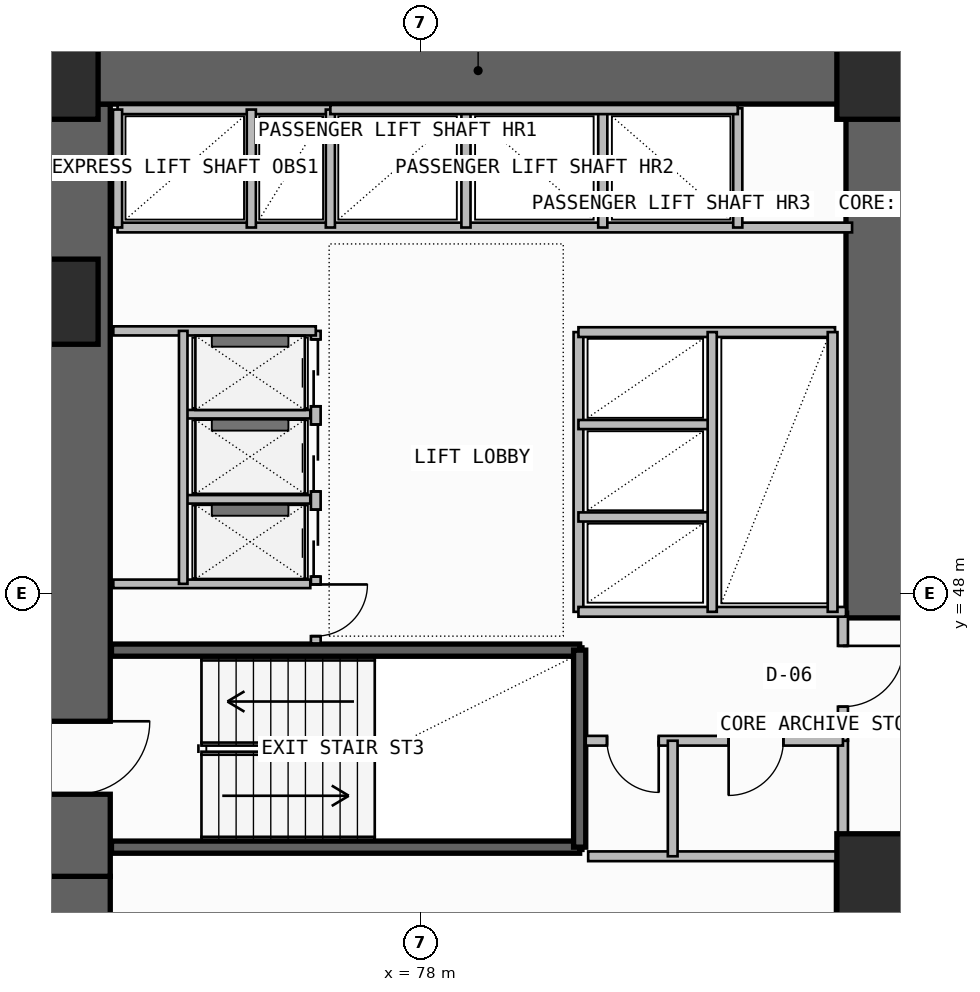
"""IFC4 building model, lengths in metres.
Left out: names, types, materials, properties, quantities, classifications, styles, units other than length and angle.
Written with IfcOpenShell. Run it as: python <this file> out.ifc"""

import sys

from ifc_helpers import new_model, si_unit, direction, frame, frame_2d, origin, origin_2d, place, context, subcontext, project, spatial, rectangle, extrude, element, fill, save


model = new_model("IFC4")
c1 = context("Model", 3, precision=1e-05, world=origin(), true_north=direction((0.0, 1.0)))
c2 = subcontext(c1, "Body", "Model", "MODEL_VIEW")
j1 = project(units=[si_unit("LENGTHUNIT", "METRE"), si_unit("PLANEANGLEUNIT", "RADIAN")], contexts=[c1])
p1 = place(None, origin())
s1 = spatial("IfcSite", under=j1, at=p1, CompositionType="ELEMENT")
p2 = place(p1, origin())
s2 = spatial("IfcBuilding", under=s1, at=p2, CompositionType="ELEMENT")
p3 = place(p2, frame((0.0, 0.0, 41.1)))
s3 = spatial("IfcBuildingStorey", under=s2, at=p3, CompositionType="ELEMENT", Elevation=41.1)
p4 = place(p3, frame((72.35, 35.5, -0.2), z_axis=(0.0, 0.0, 1.0), x_axis=(0.0, 1.0, 0.0)))
e1 = element("IfcWall", 1, at=p4, inside=s3, PredefinedType="SHEAR", context=c2, shape_type="SweptSolid", body=[
    extrude(rectangle(XDim=7.85, YDim=1.1, at=frame_2d((3.925, 0.0))), origin(), (0.0, 0.0, 1.0), 3.6),
])
p5 = place(p4, frame((1.45, 0.0, 0.2)))
e2 = element("IfcOpeningElement", 2, at=p5, cuts=e1, PredefinedType="OPENING", context=c2, shape_type="SweptSolid", body=[
    extrude(rectangle(XDim=1.2, YDim=2.2, at=frame_2d((0.6, 1.1))), frame((0.0, 0.56, 0.0), z_axis=(0.0, -1.0, 0.0), x_axis=(1.0, 0.0, 0.0)), (0.0, 0.0, 1.0), 1.12),
])
p6 = place(p3, frame((72.35, 43.35, -0.2), z_axis=(0.0, 0.0, 1.0), x_axis=(0.0, 1.0, 0.0)))
e3 = element("IfcWall", 3, at=p6, inside=s3, PredefinedType="SHEAR", context=c2, shape_type="SweptSolid", body=[
    extrude(rectangle(XDim=12.7, YDim=1.1, at=frame_2d((6.35, 0.0))), origin(), (0.0, 0.0, 1.0), 3.6),
])
p7 = place(p6, frame((1.35, 0.0, 0.2)))
e4 = element("IfcOpeningElement", 4, at=p7, cuts=e3, PredefinedType="OPENING", context=c2, shape_type="SweptSolid", body=[
    extrude(rectangle(XDim=1.2, YDim=2.2, at=frame_2d((0.6, 1.1))), frame((0.0, 0.56, 0.0), z_axis=(0.0, -1.0, 0.0), x_axis=(1.0, 0.0, 0.0)), (0.0, 0.0, 1.0), 1.12),
])
p8 = place(p3, frame((71.8, 56.6, -0.2), z_axis=(0.0, 0.0, 1.0), x_axis=(1.0, 0.0, 0.0)))
e5 = element("IfcWall", 5, at=p8, inside=s3, PredefinedType="SHEAR", context=c2, shape_type="SweptSolid", body=[
    extrude(rectangle(XDim=14.3, YDim=1.1, at=frame_2d((7.15, 0.0))), origin(), (0.0, 0.0, 1.0), 3.6),
])
p9 = place(p3, frame((85.55, 47.6, -0.2), z_axis=(0.0, 0.0, 1.0), x_axis=(0.0, 1.0, 0.0)))
e6 = element("IfcWall", 6, at=p9, inside=s3, PredefinedType="SHEAR", context=c2, shape_type="SweptSolid", body=[
    extrude(rectangle(XDim=8.45, YDim=1.1, at=frame_2d((4.225, 0.0))), origin(), (0.0, 0.0, 1.0), 3.6),
])
for number, where, z_axis, x_axis in (
    (7, (85.55, 43.35, 0.0), (0.0, 0.0, 1.0), (1.0, 0.0, 0.0)),
    (8, (72.0, 52.8, 0.0), (0.0, 0.0, 1.0), (1.0, 0.0, 0.0)),
    (9, (72.0, 56.5, 0.0), (0.0, 0.0, 1.0), (1.0, 0.0, 0.0)),
    (10, (85.55, 56.5, 0.0), (0.0, 0.0, 1.0), (1.0, 0.0, 0.0)),
):
    element("IfcColumn", number, at=place(p3, frame(where, z_axis=z_axis, x_axis=x_axis)), inside=s3, PredefinedType="COLUMN", context=c2, shape_type="SweptSolid", body=[
        extrude(rectangle(XDim=1.4, YDim=1.4, at=origin_2d()), origin(), (0.0, 0.0, 1.0), 3.6),
    ])
p10 = place(p3, frame((84.92, 38.85, 0.0), z_axis=(0.0, 0.0, 1.0), x_axis=(0.0, 1.0, 0.0)))
e11 = element("IfcWall", 11, at=p10, inside=s3, PredefinedType="SOLIDWALL", context=c2, shape_type="SweptSolid", body=[
    extrude(rectangle(XDim=4.83, YDim=0.2, at=frame_2d((2.415, 0.0))), origin(), (0.0, 0.0, 1.0), 3.4),
])
p11 = place(p10, frame((1.25, 0.0, 0.0)))
e12 = element("IfcOpeningElement", 12, at=p11, cuts=e11, PredefinedType="OPENING", context=c2, shape_type="SweptSolid", body=[
    extrude(rectangle(XDim=1.1, YDim=2.2, at=frame_2d((0.55, 1.1))), frame((0.0, 0.11, 0.0), z_axis=(0.0, -1.0, 0.0), x_axis=(1.0, 0.0, 0.0)), (0.0, 0.0, 1.0), 0.22),
])
for number, where, z_axis, x_axis in (
    (13, (72.92, 43.83, -0.2), (0.0, 0.0, 1.0), (1.0, 0.0, 0.0)),
    (14, (72.92, 47.07, -0.2), (0.0, 0.0, 1.0), (1.0, 0.0, 0.0)),
):
    element("IfcWall", number, at=place(p3, frame(where, z_axis=z_axis, x_axis=x_axis)), inside=s3, PredefinedType="SOLIDWALL", context=c2, shape_type="SweptSolid", body=[
        extrude(rectangle(XDim=7.7, YDim=0.2, at=frame_2d((3.85, 0.0))), origin(), (0.0, 0.0, 1.0), 3.6),
    ])
p12 = place(p3, frame((80.62, 43.83, -0.2), z_axis=(0.0, 0.0, 1.0), x_axis=(0.0, 1.0, 0.0)))
e15 = element("IfcWall", 15, at=p12, inside=s3, PredefinedType="SOLIDWALL", context=c2, shape_type="SweptSolid", body=[
    extrude(rectangle(XDim=3.24, YDim=0.2, at=frame_2d((1.62, 0.0))), origin(), (0.0, 0.0, 1.0), 3.6),
])
p13 = place(p3, frame((84.95, 43.68, 0.0), z_axis=(0.0, 0.0, 1.0), x_axis=(0.0, 1.0, 0.0)))
e16 = element("IfcWall", 16, at=p13, inside=s3, PredefinedType="PLUMBINGWALL", context=c2, shape_type="SweptSolid", body=[
    extrude(rectangle(XDim=1.9, YDim=0.165, at=frame_2d((0.95, 0.0))), origin(), (0.0, 0.0, 1.0), 3.4),
])
p14 = place(p3, frame((84.95, 45.58, 0.0), z_axis=(0.0, 0.0, 1.0), x_axis=(0.0, 1.0, 0.0)))
e17 = element("IfcWall", 17, at=p14, inside=s3, PredefinedType="PARTITIONING", context=c2, shape_type="SweptSolid", body=[
    extrude(rectangle(XDim=2.12, YDim=0.165, at=frame_2d((1.06, 0.0))), origin(), (0.0, 0.0, 1.0), 3.4),
])
p15 = place(p14, frame((0.56, 0.0, 0.0)))
e18 = element("IfcOpeningElement", 18, at=p15, cuts=e17, PredefinedType="OPENING", context=c2, shape_type="SweptSolid", body=[
    extrude(rectangle(XDim=1.0, YDim=2.2, at=frame_2d((0.5, 1.1))), frame((0.0, 0.093, 0.0), z_axis=(0.0, -1.0, 0.0), x_axis=(1.0, 0.0, 0.0)), (0.0, 0.0, 1.0), 0.185),
])
p16 = place(p3, frame((80.72, 45.58, 0.0), z_axis=(0.0, 0.0, 1.0), x_axis=(1.0, 0.0, 0.0)))
e19 = element("IfcWall", 19, at=p16, inside=s3, PredefinedType="PLUMBINGWALL", context=c2, shape_type="SweptSolid", body=[
    extrude(rectangle(XDim=4.23, YDim=0.16, at=frame_2d((2.115, 0.0))), origin(), (0.0, 0.0, 1.0), 3.4),
])
p17 = place(p16, frame((0.35, 0.0, 0.0)))
e20 = element("IfcOpeningElement", 20, at=p17, cuts=e19, PredefinedType="OPENING", context=c2, shape_type="SweptSolid", body=[
    extrude(rectangle(XDim=0.85, YDim=2.05, at=frame_2d((0.425, 1.025))), frame((0.0, 0.09, 0.0), z_axis=(0.0, -1.0, 0.0), x_axis=(1.0, 0.0, 0.0)), (0.0, 0.0, 1.0), 0.18),
])
p18 = place(p16, frame((2.35, 0.0, 0.0)))
e21 = element("IfcOpeningElement", 21, at=p18, cuts=e19, PredefinedType="OPENING", context=c2, shape_type="SweptSolid", body=[
    extrude(rectangle(XDim=0.9, YDim=2.1, at=frame_2d((0.45, 1.05))), frame((0.0, 0.09, 0.0), z_axis=(0.0, -1.0, 0.0), x_axis=(1.0, 0.0, 0.0)), (0.0, 0.0, 1.0), 0.18),
])
p19 = place(p3, frame((80.76, 43.68, 0.0), z_axis=(0.0, 0.0, 1.0), x_axis=(1.0, 0.0, 0.0)))
e22 = element("IfcWall", 22, at=p19, inside=s3, PredefinedType="PLUMBINGWALL", context=c2, shape_type="SweptSolid", body=[
    extrude(rectangle(XDim=4.19, YDim=0.16, at=frame_2d((2.095, 0.0))), origin(), (0.0, 0.0, 1.0), 3.4),
])
p20 = place(p3, frame((82.15, 43.68, 0.0), z_axis=(0.0, 0.0, 1.0), x_axis=(0.0, 1.0, 0.0)))
e23 = element("IfcWall", 23, at=p20, inside=s3, PredefinedType="PLUMBINGWALL", context=c2, shape_type="SweptSolid", body=[
    extrude(rectangle(XDim=1.9, YDim=0.16, at=frame_2d((0.95, 0.0))), origin(), (0.0, 0.0, 1.0), 3.4),
])
p21 = place(p3, frame((76.28, 47.18, 0.0), z_axis=(0.0, 0.0, 1.0), x_axis=(0.0, 1.0, 0.0)))
e24 = element("IfcWall", 24, at=p21, inside=s3, PredefinedType="SOLIDWALL", context=c2, shape_type="SweptSolid", body=[
    extrude(rectangle(XDim=5.14, YDim=0.16, at=frame_2d((2.57, 0.0))), origin(), (0.0, 0.0, 1.0), 3.4),
])
p22 = place(p21, frame((1.1, 0.0, 0.0)))
e25 = element("IfcOpeningElement", 25, at=p22, cuts=e24, PredefinedType="OPENING", context=c2, shape_type="SweptSolid", body=[
    extrude(rectangle(XDim=1.1, YDim=2.25, at=frame_2d((0.55, 1.125))), frame((0.0, 0.09, 0.0), z_axis=(0.0, -1.0, 0.0), x_axis=(1.0, 0.0, 0.0)), (0.0, 0.0, 1.0), 0.18),
])
p23 = place(p21, frame((2.5, 0.0, 0.0)))
e26 = element("IfcOpeningElement", 26, at=p23, cuts=e24, PredefinedType="OPENING", context=c2, shape_type="SweptSolid", body=[
    extrude(rectangle(XDim=1.1, YDim=2.25, at=frame_2d((0.55, 1.125))), frame((0.0, 0.09, 0.0), z_axis=(0.0, -1.0, 0.0), x_axis=(1.0, 0.0, 0.0)), (0.0, 0.0, 1.0), 0.18),
])
p24 = place(p21, frame((3.9, 0.0, 0.0)))
e27 = element("IfcOpeningElement", 27, at=p24, cuts=e24, PredefinedType="OPENING", context=c2, shape_type="SweptSolid", body=[
    extrude(rectangle(XDim=1.1, YDim=2.25, at=frame_2d((0.55, 1.125))), frame((0.0, 0.09, 0.0), z_axis=(0.0, -1.0, 0.0), x_axis=(1.0, 0.0, 0.0)), (0.0, 0.0, 1.0), 0.18),
])
p25 = place(p21, frame((0.12, 0.0, 0.0)))
e28 = element("IfcOpeningElement", 28, at=p25, cuts=e24, PredefinedType="OPENING", context=c2, shape_type="SweptSolid", body=[
    extrude(rectangle(XDim=0.85, YDim=2.05, at=frame_2d((0.425, 1.025))), frame((0.0, 0.09, 0.0), z_axis=(0.0, -1.0, 0.0), x_axis=(1.0, 0.0, 0.0)), (0.0, 0.0, 1.0), 0.18),
])
p26 = place(p3, frame((72.95, 52.32, 0.0), z_axis=(0.0, 0.0, 1.0), x_axis=(1.0, 0.0, 0.0)))
e29 = element("IfcWall", 29, at=p26, inside=s3, PredefinedType="SOLIDWALL", context=c2, shape_type="SweptSolid", body=[
    extrude(rectangle(XDim=3.33, YDim=0.15, at=frame_2d((1.665, 0.0))), origin(), (0.0, 0.0, 1.0), 3.4),
])
p27 = place(p3, frame((72.95, 48.16, 0.0), z_axis=(0.0, 0.0, 1.0), x_axis=(1.0, 0.0, 0.0)))
e30 = element("IfcWall", 30, at=p27, inside=s3, PredefinedType="PLUMBINGWALL", context=c2, shape_type="SweptSolid", body=[
    extrude(rectangle(XDim=3.24, YDim=0.14, at=frame_2d((1.62, 0.0))), origin(), (0.0, 0.0, 1.0), 3.4),
])
for number, where, z_axis, x_axis in (
    (31, (74.15, 49.55, 0.0), (0.0, 0.0, 1.0), (1.0, 0.0, 0.0)),
    (32, (74.15, 50.95, 0.0), (0.0, 0.0, 1.0), (1.0, 0.0, 0.0)),
):
    element("IfcWall", number, at=place(p3, frame(where, z_axis=z_axis, x_axis=x_axis)), inside=s3, PredefinedType="PLUMBINGWALL", context=c2, shape_type="SweptSolid", body=[
        extrude(rectangle(XDim=2.04, YDim=0.14, at=frame_2d((1.02, 0.0))), origin(), (0.0, 0.0, 1.0), 3.4),
    ])
p28 = place(p3, frame((74.1, 48.16, 0.0), z_axis=(0.0, 0.0, 1.0), x_axis=(0.0, 1.0, 0.0)))
e33 = element("IfcWall", 33, at=p28, inside=s3, PredefinedType="PLUMBINGWALL", context=c2, shape_type="SweptSolid", body=[
    extrude(rectangle(XDim=4.16, YDim=0.14, at=frame_2d((2.08, 0.0))), origin(), (0.0, 0.0, 1.0), 3.4),
])
p29 = place(p3, frame((80.6, 47.7, 0.0), z_axis=(0.0, 0.0, 1.0), x_axis=(0.0, 1.0, 0.0)))
e34 = element("IfcWall", 34, at=p29, inside=s3, PredefinedType="SOLIDWALL", context=c2, shape_type="SweptSolid", body=[
    extrude(rectangle(XDim=4.6, YDim=0.16, at=frame_2d((2.3, 0.0))), origin(), (0.0, 0.0, 1.0), 3.4),
])
p30 = place(p3, frame((80.6, 47.7, 0.0), z_axis=(0.0, 0.0, 1.0), x_axis=(1.0, 0.0, 0.0)))
e35 = element("IfcWall", 35, at=p30, inside=s3, PredefinedType="SOLIDWALL", context=c2, shape_type="SweptSolid", body=[
    extrude(rectangle(XDim=4.4, YDim=0.16, at=frame_2d((2.2, 0.0))), origin(), (0.0, 0.0, 1.0), 3.4),
])
p31 = place(p3, frame((80.6, 52.3, 0.0), z_axis=(0.0, 0.0, 1.0), x_axis=(1.0, 0.0, 0.0)))
e36 = element("IfcWall", 36, at=p31, inside=s3, PredefinedType="SOLIDWALL", context=c2, shape_type="SweptSolid", body=[
    extrude(rectangle(XDim=4.22, YDim=0.16, at=frame_2d((2.11, 0.0))), origin(), (0.0, 0.0, 1.0), 3.4),
])
for number, where, z_axis, x_axis in (
    (37, (80.6, 49.26, 0.0), (0.0, 0.0, 1.0), (1.0, 0.0, 0.0)),
    (38, (80.6, 50.78, 0.0), (0.0, 0.0, 1.0), (1.0, 0.0, 0.0)),
):
    element("IfcWall", number, at=place(p3, frame(where, z_axis=z_axis, x_axis=x_axis)), inside=s3, PredefinedType="PLUMBINGWALL", context=c2, shape_type="SweptSolid", body=[
        extrude(rectangle(XDim=2.2, YDim=0.15, at=frame_2d((1.1, 0.0))), origin(), (0.0, 0.0, 1.0), 3.4),
    ])
p32 = place(p3, frame((82.8, 47.7, 0.0), z_axis=(0.0, 0.0, 1.0), x_axis=(0.0, 1.0, 0.0)))
e39 = element("IfcWall", 39, at=p32, inside=s3, PredefinedType="PLUMBINGWALL", context=c2, shape_type="SweptSolid", body=[
    extrude(rectangle(XDim=4.6, YDim=0.15, at=frame_2d((2.3, 0.0))), origin(), (0.0, 0.0, 1.0), 3.4),
])
p33 = place(p3, frame((84.78, 47.7, 0.0), z_axis=(0.0, 0.0, 1.0), x_axis=(0.0, 1.0, 0.0)))
e40 = element("IfcWall", 40, at=p33, inside=s3, PredefinedType="SOLIDWALL", context=c2, shape_type="SweptSolid", body=[
    extrude(rectangle(XDim=4.6, YDim=0.16, at=frame_2d((2.3, 0.0))), origin(), (0.0, 0.0, 1.0), 3.4),
])
p34 = place(p3, frame((73.02, 54.02, 0.0), z_axis=(0.0, 0.0, 1.0), x_axis=(1.0, 0.0, 0.0)))
e41 = element("IfcWall", 41, at=p34, inside=s3, PredefinedType="SOLIDWALL", context=c2, shape_type="SweptSolid", body=[
    extrude(rectangle(XDim=12.08, YDim=0.16, at=frame_2d((6.04, 0.0))), origin(), (0.0, 0.0, 1.0), 3.4),
])
p35 = place(p3, frame((73.02, 55.96, 0.0), z_axis=(0.0, 0.0, 1.0), x_axis=(1.0, 0.0, 0.0)))
e42 = element("IfcWall", 42, at=p35, inside=s3, PredefinedType="SOLIDWALL", context=c2, shape_type="SweptSolid", body=[
    extrude(rectangle(XDim=3.5, YDim=0.15, at=frame_2d((1.75, 0.0))), origin(), (0.0, 0.0, 1.0), 3.4),
])
p36 = place(p3, frame((73.02, 54.02, 0.0), z_axis=(0.0, 0.0, 1.0), x_axis=(0.0, 1.0, 0.0)))
e43 = element("IfcWall", 43, at=p36, inside=s3, PredefinedType="PLUMBINGWALL", context=c2, shape_type="SweptSolid", body=[
    extrude(rectangle(XDim=1.94, YDim=0.15, at=frame_2d((0.97, 0.0))), origin(), (0.0, 0.0, 1.0), 3.4),
])
p37 = place(p3, frame((76.52, 54.02, 0.0), z_axis=(0.0, 0.0, 1.0), x_axis=(0.0, 1.0, 0.0)))
e44 = element("IfcWall", 44, at=p37, inside=s3, PredefinedType="SOLIDWALL", context=c2, shape_type="SweptSolid", body=[
    extrude(rectangle(XDim=1.94, YDim=0.15, at=frame_2d((0.97, 0.0))), origin(), (0.0, 0.0, 1.0), 3.4),
])
p38 = place(p3, frame((75.22, 54.02, 0.0), z_axis=(0.0, 0.0, 1.0), x_axis=(0.0, 1.0, 0.0)))
e45 = element("IfcWall", 45, at=p38, inside=s3, PredefinedType="PLUMBINGWALL", context=c2, shape_type="SweptSolid", body=[
    extrude(rectangle(XDim=1.94, YDim=0.15, at=frame_2d((0.97, 0.0))), origin(), (0.0, 0.0, 1.0), 3.4),
])
for number, where, z_axis, x_axis in (
    (46, (78.75, 54.02, 0.0), (0.0, 0.0, 1.0), (0.0, 1.0, 0.0)),
    (47, (81.0, 54.02, 0.0), (0.0, 0.0, 1.0), (0.0, 1.0, 0.0)),
):
    element("IfcWall", number, at=place(p3, frame(where, z_axis=z_axis, x_axis=x_axis)), inside=s3, PredefinedType="PLUMBINGWALL", context=c2, shape_type="SweptSolid", body=[
        extrude(rectangle(XDim=1.96, YDim=0.15, at=frame_2d((0.98, 0.0))), origin(), (0.0, 0.0, 1.0), 3.4),
    ])
p39 = place(p3, frame((83.22, 54.02, 0.0), z_axis=(0.0, 0.0, 1.0), x_axis=(0.0, 1.0, 0.0)))
e48 = element("IfcWall", 48, at=p39, inside=s3, PredefinedType="SOLIDWALL", context=c2, shape_type="SweptSolid", body=[
    extrude(rectangle(XDim=1.96, YDim=0.15, at=frame_2d((0.98, 0.0))), origin(), (0.0, 0.0, 1.0), 3.4),
])
p40 = place(p3, frame((76.52, 55.96, 0.0), z_axis=(0.0, 0.0, 1.0), x_axis=(1.0, 0.0, 0.0)))
e49 = element("IfcWall", 49, at=p40, inside=s3, PredefinedType="SOLIDWALL", context=c2, shape_type="SweptSolid", body=[
    extrude(rectangle(XDim=6.7, YDim=0.15, at=frame_2d((3.35, 0.0))), origin(), (0.0, 0.0, 1.0), 3.4),
])
p41 = place(p7, frame((1.2, 0.0, 0.0), z_axis=(0.0, 0.0, 1.0), x_axis=(-1.0, 0.0, 0.0)))
e50 = element("IfcDoor", 50, at=p41, inside=s3, OperationType="SINGLE_SWING_LEFT", PredefinedType="USERDEFINED", context=c2, shape_type="SweptSolid", body=[
    extrude(rectangle(XDim=1.2, YDim=2.2, at=frame_2d((0.6, 1.1))), frame((0.0, 0.025, 0.0), z_axis=(0.0, -1.0, 0.0), x_axis=(1.0, 0.0, 0.0)), (0.0, 0.0, 1.0), 0.05),
])
fill(e4, e50)
p42 = place(p15, frame((1.0, 0.0, 0.0), z_axis=(0.0, 0.0, 1.0), x_axis=(-1.0, 0.0, 0.0)))
e51 = element("IfcDoor", 51, at=p42, inside=s3, OperationType="SINGLE_SWING_LEFT", PredefinedType="DOOR", context=c2, shape_type="SweptSolid", body=[
    extrude(rectangle(XDim=1.0, YDim=2.2, at=frame_2d((0.5, 1.1))), frame((0.0, 0.025, 0.0), z_axis=(0.0, -1.0, 0.0), x_axis=(1.0, 0.0, 0.0)), (0.0, 0.0, 1.0), 0.05),
])
fill(e18, e51)
p43 = place(p17, frame((0.85, 0.0, 0.0), z_axis=(0.0, 0.0, 1.0), x_axis=(-1.0, 0.0, 0.0)))
e52 = element("IfcDoor", 52, at=p43, inside=s3, OperationType="SINGLE_SWING_LEFT", PredefinedType="DOOR", context=c2, shape_type="SweptSolid", body=[
    extrude(rectangle(XDim=0.85, YDim=2.05, at=frame_2d((0.425, 1.025))), frame((0.0, 0.025, 0.0), z_axis=(0.0, -1.0, 0.0), x_axis=(1.0, 0.0, 0.0)), (0.0, 0.0, 1.0), 0.05),
])
fill(e20, e52)
p44 = place(p18, frame((0.9, 0.0, 0.0), z_axis=(0.0, 0.0, 1.0), x_axis=(-1.0, 0.0, 0.0)))
e53 = element("IfcDoor", 53, at=p44, inside=s3, OperationType="SINGLE_SWING_RIGHT", PredefinedType="DOOR", context=c2, shape_type="SweptSolid", body=[
    extrude(rectangle(XDim=0.9, YDim=2.1, at=frame_2d((0.45, 1.05))), frame((0.0, 0.025, 0.0), z_axis=(0.0, -1.0, 0.0), x_axis=(1.0, 0.0, 0.0)), (0.0, 0.0, 1.0), 0.05),
])
fill(e21, e53)
p45 = place(p22, origin())
e54 = element("IfcDoor", 54, at=p45, inside=s3, OperationType="DOUBLE_DOOR_SLIDING", PredefinedType="DOOR", context=c2, shape_type="SweptSolid", body=[
    extrude(rectangle(XDim=1.1, YDim=2.25, at=frame_2d((0.55, 1.125))), frame((0.0, 0.025, 0.0), z_axis=(0.0, -1.0, 0.0), x_axis=(1.0, 0.0, 0.0)), (0.0, 0.0, 1.0), 0.05),
])
fill(e25, e54)
p46 = place(p23, origin())
e55 = element("IfcDoor", 55, at=p46, inside=s3, OperationType="DOUBLE_DOOR_SLIDING", PredefinedType="DOOR", context=c2, shape_type="SweptSolid", body=[
    extrude(rectangle(XDim=1.1, YDim=2.25, at=frame_2d((0.55, 1.125))), frame((0.0, 0.025, 0.0), z_axis=(0.0, -1.0, 0.0), x_axis=(1.0, 0.0, 0.0)), (0.0, 0.0, 1.0), 0.05),
])
fill(e26, e55)
p47 = place(p24, origin())
e56 = element("IfcDoor", 56, at=p47, inside=s3, OperationType="DOUBLE_DOOR_SLIDING", PredefinedType="DOOR", context=c2, shape_type="SweptSolid", body=[
    extrude(rectangle(XDim=1.1, YDim=2.25, at=frame_2d((0.55, 1.125))), frame((0.0, 0.025, 0.0), z_axis=(0.0, -1.0, 0.0), x_axis=(1.0, 0.0, 0.0)), (0.0, 0.0, 1.0), 0.05),
])
fill(e27, e56)
p48 = place(p25, frame((0.85, 0.0, 0.0), z_axis=(0.0, 0.0, 1.0), x_axis=(-1.0, 0.0, 0.0)))
e57 = element("IfcDoor", 57, at=p48, inside=s3, OperationType="SINGLE_SWING_LEFT", PredefinedType="DOOR", context=c2, shape_type="SweptSolid", body=[
    extrude(rectangle(XDim=0.85, YDim=2.05, at=frame_2d((0.425, 1.025))), frame((0.0, 0.025, 0.0), z_axis=(0.0, -1.0, 0.0), x_axis=(1.0, 0.0, 0.0)), (0.0, 0.0, 1.0), 0.05),
])
fill(e28, e57)
save(model, sys.argv[1])
